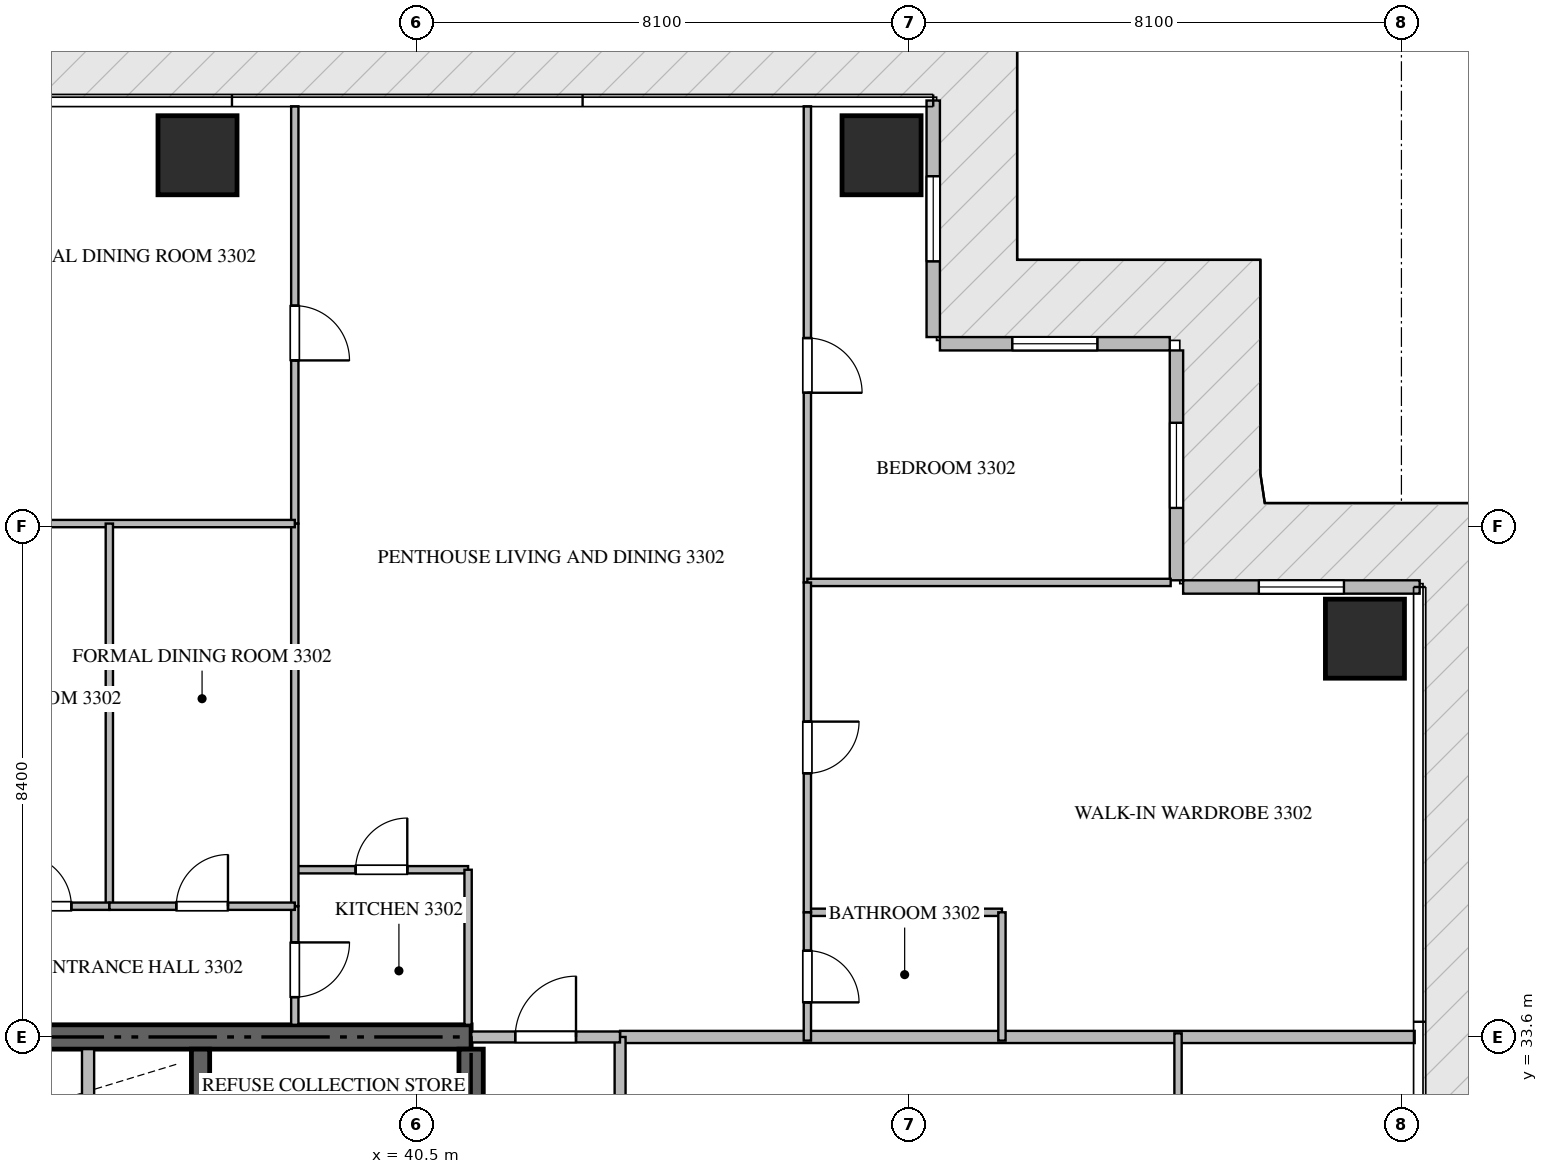
"""IFC4 building model, lengths in metres.
Left out: names, types, materials, properties, quantities, classifications, styles, units other than length and angle.
Written with IfcOpenShell. Run it as: python <this file> out.ifc"""

import sys

from ifc_helpers import new_model, si_unit, direction, frame, frame_2d, origin, origin_2d, place, context, subcontext, project, spatial, rectangle, extrude, source, transform, mapped, element, fill, save


model = new_model("IFC4")
c1 = context("Model", 3, precision=1e-05, world=origin(), true_north=direction((0.0, 1.0)))
c2 = subcontext(c1, "Body", "Model", "MODEL_VIEW")
j1 = project(units=[si_unit("LENGTHUNIT", "METRE"), si_unit("PLANEANGLEUNIT", "RADIAN")], contexts=[c1])
p1 = place(None, origin())
s1 = spatial("IfcSite", under=j1, at=p1, CompositionType="ELEMENT")
p2 = place(p1, origin())
s2 = spatial("IfcBuilding", under=s1, at=p2, CompositionType="ELEMENT")
p3 = place(p2, frame((0.0, 0.0, 135.15)))
s3 = spatial("IfcBuildingStorey", under=s2, at=p3, CompositionType="ELEMENT", Elevation=135.15)
p4 = place(p3, frame((41.4, 33.6, -0.26), z_axis=(0.0, 0.0, 1.0), x_axis=(-1.0, 0.0, 0.0)))
e1 = element("IfcWall", 1, at=p4, inside=s3, PredefinedType="SHEAR", context=c2, shape_type="SweptSolid", body=[
    extrude(rectangle(XDim=18.0, YDim=0.4, at=frame_2d((9.0, 0.0))), origin(), (0.0, 0.0, 1.0), 3.748),
])
p5 = place(p3, frame((41.4, 27.75, -0.26), z_axis=(0.0, 0.0, 1.0), x_axis=(0.0, 1.0, 0.0)))
e2 = element("IfcWall", 2, at=p5, inside=s3, PredefinedType="SHEAR", context=c2, shape_type="SweptSolid", body=[
    extrude(rectangle(XDim=5.65, YDim=0.4, at=frame_2d((2.825, 0.0))), origin(), (0.0, 0.0, 1.0), 3.748),
])
p6 = place(p3, frame((36.95, 27.05, -0.26), z_axis=(0.0, 0.0, 1.0), x_axis=(0.0, 1.0, 0.0)))
e3 = element("IfcWall", 3, at=p6, inside=s3, PredefinedType="SHEAR", context=c2, shape_type="SweptSolid", body=[
    extrude(rectangle(XDim=6.35, YDim=0.3, at=frame_2d((3.175, 0.0))), origin(), (0.0, 0.0, 1.0), 3.748),
])
m1 = source(origin(), c2, "Body", "SweptSolid", [
    extrude(rectangle(XDim=1.3, YDim=1.3, at=origin_2d()), origin(), (0.0, 0.0, 1.0), 3.75),
])
for number, where, z_axis, x_axis in (
    (4, (36.9, 48.1, -0.26), (0.0, 0.0, 1.0), (1.0, 0.0, 0.0)),
    (5, (48.15, 48.1, -0.26), (0.0, 0.0, 1.0), (1.0, 0.0, 0.0)),
    (6, (56.1, 40.15, -0.26), (0.0, 0.0, 1.0), (1.0, 0.0, 0.0)),
):
    element("IfcColumn", number, at=place(p3, frame(where, z_axis=z_axis, x_axis=x_axis)), inside=s3, PredefinedType="COLUMN", context=c2, shape_type="MappedRepresentation", body=[
        mapped(m1, transform((0.0, 0.0, 0.0), scale=1.0)),
    ])
p7 = place(p3, frame((57.0, 41.0, 0.0), z_axis=(0.0, 0.0, 1.0), x_axis=(-1.0, 0.0, 0.0)))
e7 = element("IfcWall", 7, at=p7, inside=s3, PredefinedType="ELEMENTEDWALL", context=c2, shape_type="SweptSolid", body=[
    extrude(rectangle(XDim=3.89, YDim=0.22, at=frame_2d((1.945, 0.0))), origin(), (0.0, 0.0, 1.0), 3.475),
])
p8 = place(p7, frame((1.245, 0.0, 0.65)))
e8 = element("IfcOpeningElement", 8, at=p8, cuts=e7, PredefinedType="OPENING", context=c2, shape_type="SweptSolid", body=[
    extrude(rectangle(XDim=1.4, YDim=2.05, at=frame_2d((0.7, 1.025))), frame((0.0, 0.12, 0.0), z_axis=(0.0, -1.0, 0.0), x_axis=(1.0, 0.0, 0.0)), (0.0, 0.0, 1.0), 0.24),
])
p9 = place(p3, frame((53.0, 41.11, 0.0), z_axis=(0.0, 0.0, 1.0), x_axis=(0.0, 1.0, 0.0)))
e9 = element("IfcWall", 9, at=p9, inside=s3, PredefinedType="ELEMENTEDWALL", context=c2, shape_type="SweptSolid", body=[
    extrude(rectangle(XDim=3.78, YDim=0.22, at=frame_2d((1.89, 0.0))), origin(), (0.0, 0.0, 1.0), 3.475),
])
p10 = place(p9, frame((1.19, 0.0, 0.65)))
e10 = element("IfcOpeningElement", 10, at=p10, cuts=e9, PredefinedType="OPENING", context=c2, shape_type="SweptSolid", body=[
    extrude(rectangle(XDim=1.4, YDim=2.05, at=frame_2d((0.7, 1.025))), frame((0.0, 0.12, 0.0), z_axis=(0.0, -1.0, 0.0), x_axis=(1.0, 0.0, 0.0)), (0.0, 0.0, 1.0), 0.24),
])
p11 = place(p3, frame((52.89, 45.0, 0.0), z_axis=(0.0, 0.0, 1.0), x_axis=(-1.0, 0.0, 0.0)))
e11 = element("IfcWall", 11, at=p11, inside=s3, PredefinedType="ELEMENTEDWALL", context=c2, shape_type="SweptSolid", body=[
    extrude(rectangle(XDim=3.78, YDim=0.22, at=frame_2d((1.89, 0.0))), origin(), (0.0, 0.0, 1.0), 3.475),
])
p12 = place(p11, frame((1.19, 0.0, 0.65)))
e12 = element("IfcOpeningElement", 12, at=p12, cuts=e11, PredefinedType="OPENING", context=c2, shape_type="SweptSolid", body=[
    extrude(rectangle(XDim=1.4, YDim=2.05, at=frame_2d((0.7, 1.025))), frame((0.0, 0.12, 0.0), z_axis=(0.0, -1.0, 0.0), x_axis=(1.0, 0.0, 0.0)), (0.0, 0.0, 1.0), 0.24),
])
p13 = place(p3, frame((49.0, 45.11, 0.0), z_axis=(0.0, 0.0, 1.0), x_axis=(0.0, 1.0, 0.0)))
e13 = element("IfcWall", 13, at=p13, inside=s3, PredefinedType="ELEMENTEDWALL", context=c2, shape_type="SweptSolid", body=[
    extrude(rectangle(XDim=3.89, YDim=0.22, at=frame_2d((1.945, 0.0))), origin(), (0.0, 0.0, 1.0), 3.475),
])
p14 = place(p13, frame((1.245, 0.0, 0.65)))
e14 = element("IfcOpeningElement", 14, at=p14, cuts=e13, PredefinedType="OPENING", context=c2, shape_type="SweptSolid", body=[
    extrude(rectangle(XDim=1.4, YDim=2.05, at=frame_2d((0.7, 1.025))), frame((0.0, 0.12, 0.0), z_axis=(0.0, -1.0, 0.0), x_axis=(1.0, 0.0, 0.0)), (0.0, 0.0, 1.0), 0.24),
])
p15 = place(p3, frame((35.1, 30.75, 0.0), z_axis=(0.0, 0.0, 1.0), x_axis=(0.0, 1.0, 0.0)))
e15 = element("IfcWall", 15, at=p15, inside=s3, PredefinedType="STANDARD", context=c2, shape_type="SweptSolid", body=[
    extrude(rectangle(XDim=2.65, YDim=0.2, at=frame_2d((1.325, 0.0))), origin(), (0.0, 0.0, 1.0), 3.49),
])
p16 = place(p3, frame((43.85, 33.6, 0.0), z_axis=(0.0, 0.0, 1.0), x_axis=(1.0, 0.0, 0.0)))
e16 = element("IfcWall", 16, at=p16, inside=s3, PredefinedType="PARTITIONING", context=c2, shape_type="SweptSolid", body=[
    extrude(rectangle(XDim=13.068, YDim=0.2, at=frame_2d((6.534, 0.0))), origin(), (0.0, 0.0, 1.0), 3.49),
])
p17 = place(p3, frame((43.85, 14.9, 0.0), z_axis=(0.0, 0.0, 1.0), x_axis=(0.0, 1.0, 0.0)))
e17 = element("IfcWall", 17, at=p17, inside=s3, PredefinedType="PARTITIONING", context=c2, shape_type="SweptSolid", body=[
    extrude(rectangle(XDim=18.7, YDim=0.18, at=frame_2d((9.35, 0.0))), origin(), (0.0, 0.0, 1.0), 3.49),
])
p18 = place(p17, frame((1.805, 0.0, 0.0)))
e18 = element("IfcOpeningElement", 18, at=p18, cuts=e17, PredefinedType="OPENING", context=c2, shape_type="SweptSolid", body=[
    extrude(rectangle(XDim=1.0, YDim=2.15, at=frame_2d((0.5, 1.075))), frame((0.0, 0.1, 0.0), z_axis=(0.0, -1.0, 0.0), x_axis=(1.0, 0.0, 0.0)), (0.0, 0.0, 1.0), 0.2),
])
p19 = place(p3, frame((41.402, 33.6, 0.0), z_axis=(0.0, 0.0, 1.0), x_axis=(1.0, 0.0, 0.0)))
e19 = element("IfcWall", 19, at=p19, inside=s3, PredefinedType="PARTITIONING", context=c2, shape_type="SweptSolid", body=[
    extrude(rectangle(XDim=2.446, YDim=0.18, at=frame_2d((1.223, 0.0))), origin(), (0.0, 0.0, 1.0), 3.49),
])
p20 = place(p19, frame((0.723, 0.0, 0.0)))
e20 = element("IfcOpeningElement", 20, at=p20, cuts=e19, PredefinedType="OPENING", context=c2, shape_type="SweptSolid", body=[
    extrude(rectangle(XDim=1.0, YDim=2.15, at=frame_2d((0.5, 1.075))), frame((0.0, 0.1, 0.0), z_axis=(0.0, -1.0, 0.0), x_axis=(1.0, 0.0, 0.0)), (0.0, 0.0, 1.0), 0.2),
])
p21 = place(p3, frame((38.5, 36.35, 0.0), z_axis=(0.0, 0.0, 1.0), x_axis=(1.0, 0.0, 0.0)))
e21 = element("IfcWall", 21, at=p21, inside=s3, PredefinedType="PARTITIONING", context=c2, shape_type="SweptSolid", body=[
    extrude(rectangle(XDim=2.85, YDim=0.12, at=frame_2d((1.425, 0.0))), origin(), (0.0, 0.0, 1.0), 3.49),
])
p22 = place(p21, frame((1.0, 0.0, 0.0)))
e22 = element("IfcOpeningElement", 22, at=p22, cuts=e21, PredefinedType="OPENING", context=c2, shape_type="SweptSolid", body=[
    extrude(rectangle(XDim=0.85, YDim=2.1, at=frame_2d((0.425, 1.05))), frame((0.0, 0.07, 0.0), z_axis=(0.0, -1.0, 0.0), x_axis=(1.0, 0.0, 0.0)), (0.0, 0.0, 1.0), 0.14),
])
p23 = place(p3, frame((41.35, 36.35, 0.0), z_axis=(0.0, 0.0, 1.0), x_axis=(0.0, -1.0, 0.0)))
e23 = element("IfcWall", 23, at=p23, inside=s3, PredefinedType="PARTITIONING", context=c2, shape_type="SweptSolid", body=[
    extrude(rectangle(XDim=2.55, YDim=0.12, at=frame_2d((1.275, 0.0))), origin(), (0.0, 0.0, 1.0), 3.49),
])
p24 = place(p3, frame((38.5, 35.75, 0.0), z_axis=(0.0, 0.0, 1.0), x_axis=(0.0, -1.0, 0.0)))
e24 = element("IfcWall", 24, at=p24, inside=s3, PredefinedType="PARTITIONING", context=c2, shape_type="SweptSolid", body=[
    extrude(rectangle(XDim=1.95, YDim=0.12, at=frame_2d((0.975, 0.0))), origin(), (0.0, 0.0, 1.0), 3.49),
])
p25 = place(p24, frame((0.595, 0.0, 0.0)))
e25 = element("IfcOpeningElement", 25, at=p25, cuts=e24, PredefinedType="OPENING", context=c2, shape_type="SweptSolid", body=[
    extrude(rectangle(XDim=0.9, YDim=2.1, at=frame_2d((0.45, 1.05))), frame((0.0, 0.07, 0.0), z_axis=(0.0, -1.0, 0.0), x_axis=(1.0, 0.0, 0.0)), (0.0, 0.0, 1.0), 0.14),
])
p26 = place(p3, frame((38.5, 48.905, 0.0), z_axis=(0.0, 0.0, 1.0), x_axis=(0.0, -1.0, 0.0)))
e26 = element("IfcWall", 26, at=p26, inside=s3, PredefinedType="PARTITIONING", context=c2, shape_type="SweptSolid", body=[
    extrude(rectangle(XDim=6.862, YDim=0.12, at=frame_2d((3.431, 0.0))), origin(), (0.0, 0.0, 1.0), 3.49),
])
p27 = place(p26, frame((3.279, 0.0, 0.0)))
e27 = element("IfcOpeningElement", 27, at=p27, cuts=e26, PredefinedType="OPENING", context=c2, shape_type="SweptSolid", body=[
    extrude(rectangle(XDim=0.9, YDim=2.1, at=frame_2d((0.45, 1.05))), frame((0.0, 0.07, 0.0), z_axis=(0.0, -1.0, 0.0), x_axis=(1.0, 0.0, 0.0)), (0.0, 0.0, 1.0), 0.14),
])
p28 = place(p3, frame((38.5, 42.041, 0.0), z_axis=(0.0, 0.0, 1.0), x_axis=(0.0, -1.0, 0.0)))
e28 = element("IfcWall", 28, at=p28, inside=s3, PredefinedType="PARTITIONING", context=c2, shape_type="SweptSolid", body=[
    extrude(rectangle(XDim=6.289, YDim=0.12, at=frame_2d((3.145, 0.0))), origin(), (0.0, 0.0, 1.0), 3.49),
])
p29 = place(p3, frame((33.35, 42.043, 0.0), z_axis=(0.0, 0.0, 1.0), x_axis=(1.0, 0.0, 0.0)))
e29 = element("IfcWall", 29, at=p29, inside=s3, PredefinedType="PARTITIONING", context=c2, shape_type="SweptSolid", body=[
    extrude(rectangle(XDim=5.15, YDim=0.12, at=frame_2d((2.575, 0.0))), origin(), (0.0, 0.0, 1.0), 3.49),
])
p30 = place(p3, frame((35.45, 42.043, 0.0), z_axis=(0.0, 0.0, 1.0), x_axis=(0.0, -1.0, 0.0)))
e30 = element("IfcWall", 30, at=p30, inside=s3, PredefinedType="PARTITIONING", context=c2, shape_type="SweptSolid", body=[
    extrude(rectangle(XDim=6.293, YDim=0.12, at=frame_2d((3.146, 0.0))), origin(), (0.0, 0.0, 1.0), 3.49),
])
p31 = place(p3, frame((33.35, 35.75, 0.0), z_axis=(0.0, 0.0, 1.0), x_axis=(1.0, 0.0, 0.0)))
e31 = element("IfcWall", 31, at=p31, inside=s3, PredefinedType="PARTITIONING", context=c2, shape_type="SweptSolid", body=[
    extrude(rectangle(XDim=2.1, YDim=0.12, at=frame_2d((1.05, 0.0))), origin(), (0.0, 0.0, 1.0), 3.49),
])
p32 = place(p31, frame((0.625, 0.0, 0.0)))
e32 = element("IfcOpeningElement", 32, at=p32, cuts=e31, PredefinedType="OPENING", context=c2, shape_type="SweptSolid", body=[
    extrude(rectangle(XDim=0.85, YDim=2.1, at=frame_2d((0.425, 1.05))), frame((0.0, 0.07, 0.0), z_axis=(0.0, -1.0, 0.0), x_axis=(1.0, 0.0, 0.0)), (0.0, 0.0, 1.0), 0.14),
])
p33 = place(p3, frame((35.452, 35.75, 0.0), z_axis=(0.0, 0.0, 1.0), x_axis=(1.0, 0.0, 0.0)))
e33 = element("IfcWall", 33, at=p33, inside=s3, PredefinedType="PARTITIONING", context=c2, shape_type="SweptSolid", body=[
    extrude(rectangle(XDim=3.048, YDim=0.12, at=frame_2d((1.524, 0.0))), origin(), (0.0, 0.0, 1.0), 3.49),
])
p34 = place(p33, frame((1.099, 0.0, 0.0)))
e34 = element("IfcOpeningElement", 34, at=p34, cuts=e33, PredefinedType="OPENING", context=c2, shape_type="SweptSolid", body=[
    extrude(rectangle(XDim=0.85, YDim=2.1, at=frame_2d((0.425, 1.05))), frame((0.0, 0.07, 0.0), z_axis=(0.0, -1.0, 0.0), x_axis=(1.0, 0.0, 0.0)), (0.0, 0.0, 1.0), 0.14),
])
p35 = place(p3, frame((46.93, 48.905, 0.0), z_axis=(0.0, 0.0, 1.0), x_axis=(0.0, -1.0, 0.0)))
e35 = element("IfcWall", 35, at=p35, inside=s3, PredefinedType="PARTITIONING", context=c2, shape_type="SweptSolid", body=[
    extrude(rectangle(XDim=7.83, YDim=0.12, at=frame_2d((3.915, 0.0))), origin(), (0.0, 0.0, 1.0), 3.49),
])
p36 = place(p35, frame((3.811, 0.0, 0.0)))
e36 = element("IfcOpeningElement", 36, at=p36, cuts=e35, PredefinedType="OPENING", context=c2, shape_type="SweptSolid", body=[
    extrude(rectangle(XDim=0.9, YDim=2.1, at=frame_2d((0.45, 1.05))), frame((0.0, 0.07, 0.0), z_axis=(0.0, -1.0, 0.0), x_axis=(1.0, 0.0, 0.0)), (0.0, 0.0, 1.0), 0.14),
])
p37 = place(p3, frame((46.93, 41.075, 0.0), z_axis=(0.0, 0.0, 1.0), x_axis=(1.0, 0.0, 0.0)))
e37 = element("IfcWall", 37, at=p37, inside=s3, PredefinedType="PARTITIONING", context=c2, shape_type="SweptSolid", body=[
    extrude(rectangle(XDim=5.975, YDim=0.12, at=frame_2d((2.988, 0.0))), origin(), (0.0, 0.0, 1.0), 3.49),
])
p38 = place(p3, frame((46.93, 35.65, 0.0), z_axis=(0.0, 0.0, 1.0), x_axis=(1.0, 0.0, 0.0)))
e38 = element("IfcWall", 38, at=p38, inside=s3, PredefinedType="PARTITIONING", context=c2, shape_type="SweptSolid", body=[
    extrude(rectangle(XDim=3.2, YDim=0.12, at=frame_2d((1.6, 0.0))), origin(), (0.0, 0.0, 1.0), 3.49),
])
p39 = place(p3, frame((50.13, 35.65, 0.0), z_axis=(0.0, 0.0, 1.0), x_axis=(0.0, -1.0, 0.0)))
e39 = element("IfcWall", 39, at=p39, inside=s3, PredefinedType="PARTITIONING", context=c2, shape_type="SweptSolid", body=[
    extrude(rectangle(XDim=2.11, YDim=0.12, at=frame_2d((1.055, 0.0))), origin(), (0.0, 0.0, 1.0), 3.49),
])
p40 = place(p3, frame((46.93, 41.073, 0.0), z_axis=(0.0, 0.0, 1.0), x_axis=(0.0, -1.0, 0.0)))
e40 = element("IfcWall", 40, at=p40, inside=s3, PredefinedType="PARTITIONING", context=c2, shape_type="SweptSolid", body=[
    extrude(rectangle(XDim=5.423, YDim=0.12, at=frame_2d((2.711, 0.0))), origin(), (0.0, 0.0, 1.0), 3.49),
])
p41 = place(p40, frame((2.287, 0.0, 0.0)))
e41 = element("IfcOpeningElement", 41, at=p41, cuts=e40, PredefinedType="OPENING", context=c2, shape_type="SweptSolid", body=[
    extrude(rectangle(XDim=0.85, YDim=2.1, at=frame_2d((0.425, 1.05))), frame((0.0, 0.07, 0.0), z_axis=(0.0, -1.0, 0.0), x_axis=(1.0, 0.0, 0.0)), (0.0, 0.0, 1.0), 0.14),
])
p42 = place(p3, frame((46.93, 35.648, 0.0), z_axis=(0.0, 0.0, 1.0), x_axis=(0.0, -1.0, 0.0)))
e42 = element("IfcWall", 42, at=p42, inside=s3, PredefinedType="PARTITIONING", context=c2, shape_type="SweptSolid", body=[
    extrude(rectangle(XDim=2.108, YDim=0.12, at=frame_2d((1.054, 0.0))), origin(), (0.0, 0.0, 1.0), 3.49),
])
p43 = place(p42, frame((0.629, 0.0, 0.0)))
e43 = element("IfcOpeningElement", 43, at=p43, cuts=e42, PredefinedType="OPENING", context=c2, shape_type="SweptSolid", body=[
    extrude(rectangle(XDim=0.85, YDim=2.1, at=frame_2d((0.425, 1.05))), frame((0.0, 0.07, 0.0), z_axis=(0.0, -1.0, 0.0), x_axis=(1.0, 0.0, 0.0)), (0.0, 0.0, 1.0), 0.14),
])
p44 = place(p3, frame((53.026, 22.6, 0.0), z_axis=(0.0, 0.0, 1.0), x_axis=(0.0, 1.0, 0.0)))
e44 = element("IfcWall", 44, at=p44, inside=s3, PredefinedType="PARTITIONING", context=c2, shape_type="SweptSolid", body=[
    extrude(rectangle(XDim=11.06, YDim=0.12, at=frame_2d((5.53, 0.0))), origin(), (0.0, 0.0, 1.0), 3.49),
])
m2 = source(origin(), c2, "Body", "SweptSolid", [
    extrude(rectangle(XDim=1.4, YDim=2.05, at=frame_2d((0.7, 1.025))), frame((0.0, 0.03, 0.0), z_axis=(0.0, -1.0, 0.0), x_axis=(1.0, 0.0, 0.0)), (0.0, 0.0, 1.0), 0.06),
])
p45 = place(p8, origin())
e45 = element("IfcWindow", 45, at=p45, inside=s3, PartitioningType="SINGLE_PANEL", PredefinedType="WINDOW", context=c2, shape_type="MappedRepresentation", body=[
    mapped(m2, transform((0.0, 0.0, 0.0), scale=1.0)),
])
fill(e8, e45)
p46 = place(p10, origin())
e46 = element("IfcWindow", 46, at=p46, inside=s3, PartitioningType="SINGLE_PANEL", PredefinedType="WINDOW", context=c2, shape_type="MappedRepresentation", body=[
    mapped(m2, transform((0.0, 0.0, 0.0), scale=1.0)),
])
fill(e10, e46)
p47 = place(p12, origin())
e47 = element("IfcWindow", 47, at=p47, inside=s3, PartitioningType="SINGLE_PANEL", PredefinedType="WINDOW", context=c2, shape_type="MappedRepresentation", body=[
    mapped(m2, transform((0.0, 0.0, 0.0), scale=1.0)),
])
fill(e12, e47)
p48 = place(p14, origin())
e48 = element("IfcWindow", 48, at=p48, inside=s3, PartitioningType="SINGLE_PANEL", PredefinedType="WINDOW", context=c2, shape_type="MappedRepresentation", body=[
    mapped(m2, transform((0.0, 0.0, 0.0), scale=1.0)),
])
fill(e14, e48)
m3 = source(origin(), c2, "Body", "SweptSolid", [
    extrude(rectangle(XDim=1.0, YDim=2.15, at=frame_2d((0.5, 1.075))), frame((0.0, 0.025, 0.0), z_axis=(0.0, -1.0, 0.0), x_axis=(1.0, 0.0, 0.0)), (0.0, 0.0, 1.0), 0.05),
])
p49 = place(p20, origin())
e49 = element("IfcDoor", 49, at=p49, inside=s3, OperationType="SINGLE_SWING_RIGHT", PredefinedType="DOOR", context=c2, shape_type="MappedRepresentation", body=[
    mapped(m3, transform((0.0, 0.0, 0.0), scale=1.0)),
])
fill(e20, e49)
m4 = source(origin(), c2, "Body", "SweptSolid", [
    extrude(rectangle(XDim=0.85, YDim=2.1, at=frame_2d((0.425, 1.05))), frame((0.0, 0.025, 0.0), z_axis=(0.0, -1.0, 0.0), x_axis=(1.0, 0.0, 0.0)), (0.0, 0.0, 1.0), 0.05),
])
p50 = place(p22, origin())
e50 = element("IfcDoor", 50, at=p50, inside=s3, OperationType="SINGLE_SWING_RIGHT", PredefinedType="DOOR", context=c2, shape_type="MappedRepresentation", body=[
    mapped(m4, transform((0.0, 0.0, 0.0), scale=1.0)),
])
fill(e22, e50)
m5 = source(origin(), c2, "Body", "SweptSolid", [
    extrude(rectangle(XDim=0.9, YDim=2.1, at=frame_2d((0.45, 1.05))), frame((0.0, 0.025, 0.0), z_axis=(0.0, -1.0, 0.0), x_axis=(1.0, 0.0, 0.0)), (0.0, 0.0, 1.0), 0.05),
])
p51 = place(p25, origin())
e51 = element("IfcDoor", 51, at=p51, inside=s3, OperationType="SINGLE_SWING_LEFT", PredefinedType="DOOR", context=c2, shape_type="MappedRepresentation", body=[
    mapped(m5, transform((0.0, 0.0, 0.0), scale=1.0)),
])
fill(e25, e51)
p52 = place(p27, origin())
e52 = element("IfcDoor", 52, at=p52, inside=s3, OperationType="SINGLE_SWING_RIGHT", PredefinedType="DOOR", context=c2, shape_type="MappedRepresentation", body=[
    mapped(m5, transform((0.0, 0.0, 0.0), scale=1.0)),
])
fill(e27, e52)
p53 = place(p32, origin())
e53 = element("IfcDoor", 53, at=p53, inside=s3, OperationType="SINGLE_SWING_LEFT", PredefinedType="DOOR", context=c2, shape_type="MappedRepresentation", body=[
    mapped(m4, transform((0.0, 0.0, 0.0), scale=1.0)),
])
fill(e32, e53)
p54 = place(p34, origin())
e54 = element("IfcDoor", 54, at=p54, inside=s3, OperationType="SINGLE_SWING_RIGHT", PredefinedType="DOOR", context=c2, shape_type="MappedRepresentation", body=[
    mapped(m4, transform((0.0, 0.0, 0.0), scale=1.0)),
])
fill(e34, e54)
p55 = place(p36, origin())
e55 = element("IfcDoor", 55, at=p55, inside=s3, OperationType="SINGLE_SWING_RIGHT", PredefinedType="DOOR", context=c2, shape_type="MappedRepresentation", body=[
    mapped(m5, transform((0.0, 0.0, 0.0), scale=1.0)),
])
fill(e36, e55)
p56 = place(p41, origin())
e56 = element("IfcDoor", 56, at=p56, inside=s3, OperationType="SINGLE_SWING_LEFT", PredefinedType="DOOR", context=c2, shape_type="MappedRepresentation", body=[
    mapped(m4, transform((0.0, 0.0, 0.0), scale=1.0)),
])
fill(e41, e56)
p57 = place(p43, origin())
e57 = element("IfcDoor", 57, at=p57, inside=s3, OperationType="SINGLE_SWING_RIGHT", PredefinedType="DOOR", context=c2, shape_type="MappedRepresentation", body=[
    mapped(m4, transform((0.0, 0.0, 0.0), scale=1.0)),
])
fill(e43, e57)
save(model, sys.argv[1])
